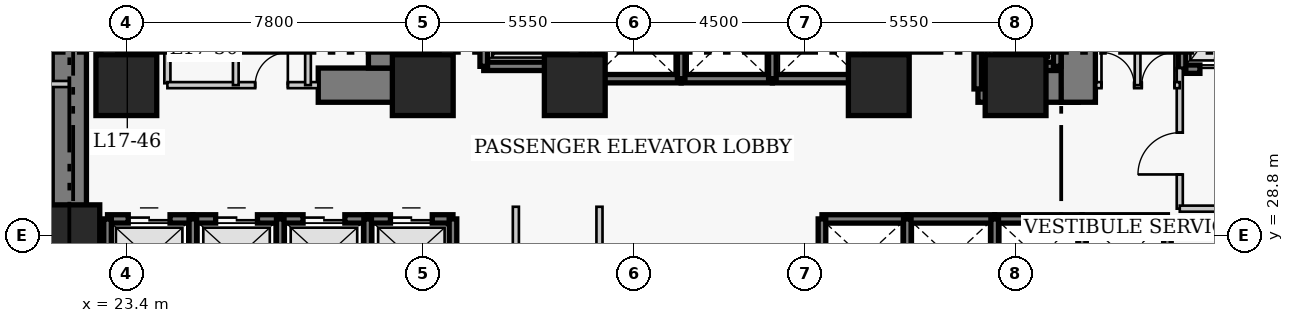
"""IFC4 building model, lengths in metres.
Left out: names, types, materials, properties, quantities, classifications, styles, units other than length and angle.
Written with IfcOpenShell. Run it as: python <this file> out.ifc"""

import sys

from ifc_helpers import new_model, si_unit, direction, frame, frame_2d, origin, origin_2d, place, context, subcontext, project, spatial, rectangle, extrude, element, fill, save


model = new_model("IFC4")
c1 = context("Model", 3, precision=1e-05, world=origin(), true_north=direction((0.0, 1.0)))
c2 = subcontext(c1, "Body", "Model", "MODEL_VIEW")
j1 = project(units=[si_unit("LENGTHUNIT", "METRE"), si_unit("PLANEANGLEUNIT", "RADIAN")], contexts=[c1])
p1 = place(None, origin())
s1 = spatial("IfcSite", under=j1, at=p1, CompositionType="ELEMENT")
p2 = place(p1, origin())
s2 = spatial("IfcBuilding", under=s1, at=p2, CompositionType="ELEMENT")
p3 = place(p2, frame((0.0, 0.0, 71.6)))
s3 = spatial("IfcBuildingStorey", under=s2, at=p3, CompositionType="ELEMENT", Elevation=71.6)
p4 = place(p3, frame((21.9, 27.05, 0.0), z_axis=(0.0, 0.0, 1.0), x_axis=(0.0, 1.0, 0.0)))
e1 = element("IfcWall", 1, at=p4, inside=s3, PredefinedType="SHEAR", context=c2, shape_type="SweptSolid", body=[
    extrude(rectangle(XDim=13.72, YDim=0.9, at=frame_2d((6.86, 0.0))), origin(), (0.0, 0.0, 1.0), 3.8),
])
p5 = place(p3, frame((28.45, 32.75, 0.0), z_axis=(0.0, 0.0, 1.0), x_axis=(1.0, 0.0, 0.0)))
e2 = element("IfcWall", 2, at=p5, inside=s3, PredefinedType="SHEAR", context=c2, shape_type="SweptSolid", body=[
    extrude(rectangle(XDim=2.4, YDim=0.9, at=frame_2d((1.2, 0.0))), origin(), (0.0, 0.0, 1.0), 3.8),
])
p6 = place(p3, frame((45.81, 32.75, 0.0), z_axis=(0.0, 0.0, 1.0), x_axis=(1.0, 0.0, 0.0)))
e3 = element("IfcWall", 3, at=p6, inside=s3, PredefinedType="SHEAR", context=c2, shape_type="SweptSolid", body=[
    extrude(rectangle(XDim=2.64, YDim=0.9, at=frame_2d((1.32, 0.0))), origin(), (0.0, 0.0, 1.0), 3.8),
])
p7 = place(p3, frame((30.22, 33.2, 0.0), z_axis=(0.0, 0.0, 1.0), x_axis=(0.0, 1.0, 0.0)))
e4 = element("IfcWall", 4, at=p7, inside=s3, PredefinedType="SHEAR", context=c2, shape_type="SweptSolid", body=[
    extrude(rectangle(XDim=7.12, YDim=0.9, at=frame_2d((3.56, 0.0))), origin(), (0.0, 0.0, 1.0), 3.8),
])
p8 = place(p3, frame((48.45, 32.3, 0.0), z_axis=(0.0, 0.0, 1.0), x_axis=(0.0, 1.0, 0.0)))
e5 = element("IfcWall", 5, at=p8, inside=s3, PredefinedType="SHEAR", context=c2, shape_type="SweptSolid", body=[
    extrude(rectangle(XDim=8.02, YDim=0.9, at=frame_2d((4.01, 0.0))), origin(), (0.0, 0.0, 1.0), 3.8),
])
p9 = place(p8, frame((5.9, 0.0, 0.0)))
e6 = element("IfcOpeningElement", 6, at=p9, cuts=e5, PredefinedType="OPENING", context=c2, shape_type="SweptSolid", body=[
    extrude(rectangle(XDim=1.1, YDim=2.15, at=frame_2d((0.55, 1.075))), frame((0.0, 0.46, 0.0), z_axis=(0.0, -1.0, 0.0), x_axis=(1.0, 0.0, 0.0)), (0.0, 0.0, 1.0), 0.92),
])
for number, where, z_axis, x_axis in (
    (7, (21.9, 28.8, 0.0), (0.0, 0.0, 1.0), (1.0, 0.0, 0.0)),
    (8, (23.4, 32.75, 0.0), (0.0, 0.0, 1.0), (1.0, 0.0, 0.0)),
    (9, (31.2, 32.75, 0.0), (0.0, 0.0, 1.0), (1.0, 0.0, 0.0)),
    (10, (35.2, 32.75, 0.0), (0.0, 0.0, 1.0), (1.0, 0.0, 0.0)),
    (11, (43.2, 32.75, 0.0), (0.0, 0.0, 1.0), (1.0, 0.0, 0.0)),
    (12, (46.8, 32.75, 0.0), (0.0, 0.0, 1.0), (1.0, 0.0, 0.0)),
):
    element("IfcColumn", number, at=place(p3, frame(where, z_axis=z_axis, x_axis=x_axis)), inside=s3, PredefinedType="COLUMN", context=c2, shape_type="SweptSolid", body=[
        extrude(rectangle(XDim=1.6, YDim=1.6, at=origin_2d()), origin(), (0.0, 0.0, 1.0), 3.8),
    ])
p10 = place(p3, frame((22.905, 29.23, 0.0), z_axis=(0.0, 0.0, 1.0), x_axis=(1.0, 0.0, 0.0)))
e13 = element("IfcWall", 13, at=p10, inside=s3, PredefinedType="SHEAR", context=c2, shape_type="SweptSolid", body=[
    extrude(rectangle(XDim=2.245, YDim=0.22, at=frame_2d((1.123, 0.0))), origin(), (0.0, 0.0, 1.0), 3.8),
])
p11 = place(p10, frame((0.545, 0.0, 0.0)))
e14 = element("IfcOpeningElement", 14, at=p11, cuts=e13, PredefinedType="OPENING", context=c2, shape_type="SweptSolid", body=[
    extrude(rectangle(XDim=1.1, YDim=2.15, at=frame_2d((0.55, 1.075))), frame((0.0, 0.12, 0.0), z_axis=(0.0, -1.0, 0.0), x_axis=(1.0, 0.0, 0.0)), (0.0, 0.0, 1.0), 0.24),
])
p12 = place(p3, frame((22.905, 27.17, 0.0), z_axis=(0.0, 0.0, 1.0), x_axis=(0.0, 1.0, 0.0)))
e15 = element("IfcWall", 15, at=p12, inside=s3, PredefinedType="SHEAR", context=c2, shape_type="SweptSolid", body=[
    extrude(rectangle(XDim=2.06, YDim=0.2, at=frame_2d((1.03, 0.0))), origin(), (0.0, 0.0, 1.0), 3.8),
])
p13 = place(p3, frame((25.15, 29.23, 0.0), z_axis=(0.0, 0.0, 1.0), x_axis=(1.0, 0.0, 0.0)))
e16 = element("IfcWall", 16, at=p13, inside=s3, PredefinedType="SHEAR", context=c2, shape_type="SweptSolid", body=[
    extrude(rectangle(XDim=2.3, YDim=0.22, at=frame_2d((1.15, 0.0))), origin(), (0.0, 0.0, 1.0), 3.8),
])
p14 = place(p13, frame((0.6, 0.0, 0.0)))
e17 = element("IfcOpeningElement", 17, at=p14, cuts=e16, PredefinedType="OPENING", context=c2, shape_type="SweptSolid", body=[
    extrude(rectangle(XDim=1.1, YDim=2.15, at=frame_2d((0.55, 1.075))), frame((0.0, 0.12, 0.0), z_axis=(0.0, -1.0, 0.0), x_axis=(1.0, 0.0, 0.0)), (0.0, 0.0, 1.0), 0.24),
])
p15 = place(p3, frame((25.15, 27.17, 0.0), z_axis=(0.0, 0.0, 1.0), x_axis=(0.0, 1.0, 0.0)))
e18 = element("IfcWall", 18, at=p15, inside=s3, PredefinedType="SHEAR", context=c2, shape_type="SweptSolid", body=[
    extrude(rectangle(XDim=2.06, YDim=0.2, at=frame_2d((1.03, 0.0))), origin(), (0.0, 0.0, 1.0), 3.8),
])
p16 = place(p3, frame((27.45, 29.23, 0.0), z_axis=(0.0, 0.0, 1.0), x_axis=(1.0, 0.0, 0.0)))
e19 = element("IfcWall", 19, at=p16, inside=s3, PredefinedType="SHEAR", context=c2, shape_type="SweptSolid", body=[
    extrude(rectangle(XDim=2.3, YDim=0.22, at=frame_2d((1.15, 0.0))), origin(), (0.0, 0.0, 1.0), 3.8),
])
p17 = place(p16, frame((0.6, 0.0, 0.0)))
e20 = element("IfcOpeningElement", 20, at=p17, cuts=e19, PredefinedType="OPENING", context=c2, shape_type="SweptSolid", body=[
    extrude(rectangle(XDim=1.1, YDim=2.15, at=frame_2d((0.55, 1.075))), frame((0.0, 0.12, 0.0), z_axis=(0.0, -1.0, 0.0), x_axis=(1.0, 0.0, 0.0)), (0.0, 0.0, 1.0), 0.24),
])
p18 = place(p3, frame((27.45, 27.17, 0.0), z_axis=(0.0, 0.0, 1.0), x_axis=(0.0, 1.0, 0.0)))
e21 = element("IfcWall", 21, at=p18, inside=s3, PredefinedType="SHEAR", context=c2, shape_type="SweptSolid", body=[
    extrude(rectangle(XDim=2.06, YDim=0.2, at=frame_2d((1.03, 0.0))), origin(), (0.0, 0.0, 1.0), 3.8),
])
p19 = place(p3, frame((29.75, 29.23, 0.0), z_axis=(0.0, 0.0, 1.0), x_axis=(1.0, 0.0, 0.0)))
e22 = element("IfcWall", 22, at=p19, inside=s3, PredefinedType="SHEAR", context=c2, shape_type="SweptSolid", body=[
    extrude(rectangle(XDim=2.245, YDim=0.22, at=frame_2d((1.123, 0.0))), origin(), (0.0, 0.0, 1.0), 3.8),
])
p20 = place(p19, frame((0.6, 0.0, 0.0)))
e23 = element("IfcOpeningElement", 23, at=p20, cuts=e22, PredefinedType="OPENING", context=c2, shape_type="SweptSolid", body=[
    extrude(rectangle(XDim=1.1, YDim=2.15, at=frame_2d((0.55, 1.075))), frame((0.0, 0.12, 0.0), z_axis=(0.0, -1.0, 0.0), x_axis=(1.0, 0.0, 0.0)), (0.0, 0.0, 1.0), 0.24),
])
for number, where, z_axis, x_axis in (
    (24, (29.75, 27.17, 0.0), (0.0, 0.0, 1.0), (0.0, 1.0, 0.0)),
    (25, (31.995, 27.17, 0.0), (0.0, 0.0, 1.0), (0.0, 1.0, 0.0)),
):
    element("IfcWall", number, at=place(p3, frame(where, z_axis=z_axis, x_axis=x_axis)), inside=s3, PredefinedType="SHEAR", context=c2, shape_type="SweptSolid", body=[
        extrude(rectangle(XDim=2.06, YDim=0.2, at=frame_2d((1.03, 0.0))), origin(), (0.0, 0.0, 1.0), 3.8),
    ])
p21 = place(p3, frame((41.705, 29.23, 0.0), z_axis=(0.0, 0.0, 1.0), x_axis=(1.0, 0.0, 0.0)))
e26 = element("IfcWall", 26, at=p21, inside=s3, PredefinedType="SHEAR", context=c2, shape_type="SweptSolid", body=[
    extrude(rectangle(XDim=2.245, YDim=0.22, at=frame_2d((1.123, 0.0))), origin(), (0.0, 0.0, 1.0), 3.8),
])
p22 = place(p3, frame((41.705, 27.17, 0.0), z_axis=(0.0, 0.0, 1.0), x_axis=(0.0, 1.0, 0.0)))
e27 = element("IfcWall", 27, at=p22, inside=s3, PredefinedType="SHEAR", context=c2, shape_type="SweptSolid", body=[
    extrude(rectangle(XDim=2.06, YDim=0.2, at=frame_2d((1.03, 0.0))), origin(), (0.0, 0.0, 1.0), 3.8),
])
p23 = place(p3, frame((43.95, 29.23, 0.0), z_axis=(0.0, 0.0, 1.0), x_axis=(1.0, 0.0, 0.0)))
e28 = element("IfcWall", 28, at=p23, inside=s3, PredefinedType="SHEAR", context=c2, shape_type="SweptSolid", body=[
    extrude(rectangle(XDim=2.3, YDim=0.22, at=frame_2d((1.15, 0.0))), origin(), (0.0, 0.0, 1.0), 3.8),
])
p24 = place(p3, frame((43.95, 27.17, 0.0), z_axis=(0.0, 0.0, 1.0), x_axis=(0.0, 1.0, 0.0)))
e29 = element("IfcWall", 29, at=p24, inside=s3, PredefinedType="SHEAR", context=c2, shape_type="SweptSolid", body=[
    extrude(rectangle(XDim=2.06, YDim=0.2, at=frame_2d((1.03, 0.0))), origin(), (0.0, 0.0, 1.0), 3.8),
])
p25 = place(p3, frame((46.25, 29.23, 0.0), z_axis=(0.0, 0.0, 1.0), x_axis=(1.0, 0.0, 0.0)))
e30 = element("IfcWall", 30, at=p25, inside=s3, PredefinedType="SHEAR", context=c2, shape_type="SweptSolid", body=[
    extrude(rectangle(XDim=2.3, YDim=0.22, at=frame_2d((1.15, 0.0))), origin(), (0.0, 0.0, 1.0), 3.8),
])
p26 = place(p3, frame((46.25, 27.17, 0.0), z_axis=(0.0, 0.0, 1.0), x_axis=(0.0, 1.0, 0.0)))
e31 = element("IfcWall", 31, at=p26, inside=s3, PredefinedType="SHEAR", context=c2, shape_type="SweptSolid", body=[
    extrude(rectangle(XDim=2.06, YDim=0.2, at=frame_2d((1.03, 0.0))), origin(), (0.0, 0.0, 1.0), 3.8),
])
p27 = place(p3, frame((48.55, 29.23, 0.0), z_axis=(0.0, 0.0, 1.0), x_axis=(1.0, 0.0, 0.0)))
e32 = element("IfcWall", 32, at=p27, inside=s3, PredefinedType="SHEAR", context=c2, shape_type="SweptSolid", body=[
    extrude(rectangle(XDim=2.245, YDim=0.22, at=frame_2d((1.123, 0.0))), origin(), (0.0, 0.0, 1.0), 3.8),
])
for number, where, z_axis, x_axis in (
    (33, (48.55, 27.17, 0.0), (0.0, 0.0, 1.0), (0.0, 1.0, 0.0)),
    (34, (50.795, 27.17, 0.0), (0.0, 0.0, 1.0), (0.0, 1.0, 0.0)),
):
    element("IfcWall", number, at=place(p3, frame(where, z_axis=z_axis, x_axis=x_axis)), inside=s3, PredefinedType="SHEAR", context=c2, shape_type="SweptSolid", body=[
        extrude(rectangle(XDim=2.06, YDim=0.2, at=frame_2d((1.03, 0.0))), origin(), (0.0, 0.0, 1.0), 3.8),
    ])
p28 = place(p3, frame((35.68, 32.92, 0.0), z_axis=(0.0, 0.0, 1.0), x_axis=(1.0, 0.0, 0.0)))
e35 = element("IfcWall", 35, at=p28, inside=s3, PredefinedType="SHEAR", context=c2, shape_type="SweptSolid", body=[
    extrude(rectangle(XDim=2.32, YDim=0.22, at=frame_2d((1.16, 0.0))), origin(), (0.0, 0.0, 1.0), 3.8),
])
p29 = place(p3, frame((35.68, 32.92, 0.0), z_axis=(0.0, 0.0, 1.0), x_axis=(0.0, 1.0, 0.0)))
e36 = element("IfcWall", 36, at=p29, inside=s3, PredefinedType="SHEAR", context=c2, shape_type="SweptSolid", body=[
    extrude(rectangle(XDim=2.16, YDim=0.2, at=frame_2d((1.08, 0.0))), origin(), (0.0, 0.0, 1.0), 3.8),
])
p30 = place(p3, frame((38.0, 32.92, 0.0), z_axis=(0.0, 0.0, 1.0), x_axis=(1.0, 0.0, 0.0)))
e37 = element("IfcWall", 37, at=p30, inside=s3, PredefinedType="SHEAR", context=c2, shape_type="SweptSolid", body=[
    extrude(rectangle(XDim=2.4, YDim=0.22, at=frame_2d((1.2, 0.0))), origin(), (0.0, 0.0, 1.0), 3.8),
])
p31 = place(p3, frame((38.0, 32.92, 0.0), z_axis=(0.0, 0.0, 1.0), x_axis=(0.0, 1.0, 0.0)))
e38 = element("IfcWall", 38, at=p31, inside=s3, PredefinedType="SHEAR", context=c2, shape_type="SweptSolid", body=[
    extrude(rectangle(XDim=2.16, YDim=0.2, at=frame_2d((1.08, 0.0))), origin(), (0.0, 0.0, 1.0), 3.8),
])
p32 = place(p3, frame((40.4, 32.92, 0.0), z_axis=(0.0, 0.0, 1.0), x_axis=(1.0, 0.0, 0.0)))
e39 = element("IfcWall", 39, at=p32, inside=s3, PredefinedType="SHEAR", context=c2, shape_type="SweptSolid", body=[
    extrude(rectangle(XDim=2.32, YDim=0.22, at=frame_2d((1.16, 0.0))), origin(), (0.0, 0.0, 1.0), 3.8),
])
for number, where, z_axis, x_axis in (
    (40, (40.4, 32.92, 0.0), (0.0, 0.0, 1.0), (0.0, 1.0, 0.0)),
    (41, (42.72, 32.92, 0.0), (0.0, 0.0, 1.0), (0.0, 1.0, 0.0)),
):
    element("IfcWall", number, at=place(p3, frame(where, z_axis=z_axis, x_axis=x_axis)), inside=s3, PredefinedType="SHEAR", context=c2, shape_type="SweptSolid", body=[
        extrude(rectangle(XDim=2.16, YDim=0.2, at=frame_2d((1.08, 0.0))), origin(), (0.0, 0.0, 1.0), 3.8),
    ])
p33 = place(p3, frame((51.18, 33.17, 0.0), z_axis=(0.0, 0.0, 1.0), x_axis=(1.0, 0.0, 0.0)))
e42 = element("IfcWall", 42, at=p33, inside=s3, PredefinedType="SHEAR", context=c2, shape_type="SweptSolid", body=[
    extrude(rectangle(XDim=2.42, YDim=0.22, at=frame_2d((1.21, 0.0))), origin(), (0.0, 0.0, 1.0), 3.8),
])
p34 = place(p33, frame((0.47, 0.0, 0.0)))
e43 = element("IfcOpeningElement", 43, at=p34, cuts=e42, PredefinedType="OPENING", context=c2, shape_type="SweptSolid", body=[
    extrude(rectangle(XDim=1.3, YDim=2.15, at=frame_2d((0.65, 1.075))), frame((0.0, 0.12, 0.0), z_axis=(0.0, -1.0, 0.0), x_axis=(1.0, 0.0, 0.0)), (0.0, 0.0, 1.0), 0.24),
])
p35 = place(p3, frame((51.18, 33.17, 0.0), z_axis=(0.0, 0.0, 1.0), x_axis=(0.0, 1.0, 0.0)))
e44 = element("IfcWall", 44, at=p35, inside=s3, PredefinedType="SHEAR", context=c2, shape_type="SweptSolid", body=[
    extrude(rectangle(XDim=2.86, YDim=0.2, at=frame_2d((1.43, 0.0))), origin(), (0.0, 0.0, 1.0), 3.8),
])
p36 = place(p3, frame((32.805, 33.245, 0.0), z_axis=(0.0, 0.0, 1.0), x_axis=(1.0, 0.0, 0.0)))
e45 = element("IfcWall", 45, at=p36, inside=s3, PredefinedType="SHEAR", context=c2, shape_type="SweptSolid", body=[
    extrude(rectangle(XDim=2.09, YDim=0.22, at=frame_2d((1.045, 0.0))), origin(), (0.0, 0.0, 1.0), 3.8),
])
for number, where, z_axis, x_axis in (
    (46, (32.805, 33.245, 0.0), (0.0, 0.0, 1.0), (0.0, 1.0, 0.0)),
    (47, (34.895, 33.245, 0.0), (0.0, 0.0, 1.0), (0.0, 1.0, 0.0)),
):
    element("IfcWall", number, at=place(p3, frame(where, z_axis=z_axis, x_axis=x_axis)), inside=s3, PredefinedType="SHEAR", context=c2, shape_type="SweptSolid", body=[
        extrude(rectangle(XDim=2.91, YDim=0.2, at=frame_2d((1.455, 0.0))), origin(), (0.0, 0.0, 1.0), 3.8),
    ])
p37 = place(p3, frame((45.805, 33.245, 0.0), z_axis=(0.0, 0.0, 1.0), x_axis=(1.0, 0.0, 0.0)))
e48 = element("IfcWall", 48, at=p37, inside=s3, PredefinedType="SHEAR", context=c2, shape_type="SweptSolid", body=[
    extrude(rectangle(XDim=2.09, YDim=0.22, at=frame_2d((1.045, 0.0))), origin(), (0.0, 0.0, 1.0), 3.8),
])
p38 = place(p3, frame((45.805, 32.65, 0.0), z_axis=(0.0, 0.0, 1.0), x_axis=(0.0, 1.0, 0.0)))
e49 = element("IfcWall", 49, at=p38, inside=s3, PredefinedType="SHEAR", context=c2, shape_type="SweptSolid", body=[
    extrude(rectangle(XDim=3.505, YDim=0.2, at=frame_2d((1.752, 0.0))), origin(), (0.0, 0.0, 1.0), 3.8),
])
p39 = place(p3, frame((47.895, 33.245, 0.0), z_axis=(0.0, 0.0, 1.0), x_axis=(0.0, 1.0, 0.0)))
e50 = element("IfcWall", 50, at=p39, inside=s3, PredefinedType="SHEAR", context=c2, shape_type="SweptSolid", body=[
    extrude(rectangle(XDim=2.91, YDim=0.2, at=frame_2d((1.455, 0.0))), origin(), (0.0, 0.0, 1.0), 3.8),
])
p40 = place(p3, frame((24.48, 32.8, 0.0), z_axis=(0.0, 0.0, 1.0), x_axis=(0.0, 1.0, 0.0)))
e51 = element("IfcWall", 51, at=p40, inside=s3, PredefinedType="PARTITIONING", context=c2, shape_type="SweptSolid", body=[
    extrude(rectangle(XDim=3.57, YDim=0.16, at=frame_2d((1.785, 0.0))), origin(), (0.0, 0.0, 1.0), 3.42),
])
p41 = place(p40, frame((1.604, 0.0, 0.0)))
e52 = element("IfcOpeningElement", 52, at=p41, cuts=e51, PredefinedType="OPENING", context=c2, shape_type="SweptSolid", body=[
    extrude(rectangle(XDim=0.9, YDim=2.1, at=frame_2d((0.45, 1.05))), frame((0.0, 0.09, 0.0), z_axis=(0.0, -1.0, 0.0), x_axis=(1.0, 0.0, 0.0)), (0.0, 0.0, 1.0), 0.18),
])
p42 = place(p3, frame((51.12, 29.5, 0.0), z_axis=(0.0, 0.0, 1.0), x_axis=(0.0, 1.0, 0.0)))
e53 = element("IfcWall", 53, at=p42, inside=s3, PredefinedType="PARTITIONING", context=c2, shape_type="SweptSolid", body=[
    extrude(rectangle(XDim=3.7, YDim=0.16, at=frame_2d((1.85, 0.0))), origin(), (0.0, 0.0, 1.0), 3.42),
])
p43 = place(p42, frame((0.9, 0.0, 0.0)))
e54 = element("IfcOpeningElement", 54, at=p43, cuts=e53, PredefinedType="OPENING", context=c2, shape_type="SweptSolid", body=[
    extrude(rectangle(XDim=1.1, YDim=2.15, at=frame_2d((0.55, 1.075))), frame((0.0, 0.09, 0.0), z_axis=(0.0, -1.0, 0.0), x_axis=(1.0, 0.0, 0.0)), (0.0, 0.0, 1.0), 0.18),
])
p44 = place(p3, frame((51.12, 29.5, 0.0), z_axis=(0.0, 0.0, 1.0), x_axis=(1.0, 0.0, 0.0)))
e55 = element("IfcWall", 55, at=p44, inside=s3, PredefinedType="PARTITIONING", context=c2, shape_type="SweptSolid", body=[
    extrude(rectangle(XDim=5.63, YDim=0.16, at=frame_2d((2.815, 0.0))), origin(), (0.0, 0.0, 1.0), 3.42),
])
p45 = place(p3, frame((24.48, 32.75, 0.0), z_axis=(0.0, 0.0, 1.0), x_axis=(1.0, 0.0, 0.0)))
e56 = element("IfcWall", 56, at=p45, inside=s3, PredefinedType="PARTITIONING", context=c2, shape_type="SweptSolid", body=[
    extrude(rectangle(XDim=3.97, YDim=0.16, at=frame_2d((1.985, 0.0))), origin(), (0.0, 0.0, 1.0), 3.42),
])
p46 = place(p45, frame((2.31, 0.0, 0.0)))
e57 = element("IfcOpeningElement", 57, at=p46, cuts=e56, PredefinedType="OPENING", context=c2, shape_type="SweptSolid", body=[
    extrude(rectangle(XDim=0.86, YDim=2.05, at=frame_2d((0.43, 1.025))), frame((0.0, 0.09, 0.0), z_axis=(0.0, -1.0, 0.0), x_axis=(1.0, 0.0, 0.0)), (0.0, 0.0, 1.0), 0.18),
])
p47 = place(p3, frame((48.92, 32.75, 0.0), z_axis=(0.0, 0.0, 1.0), x_axis=(1.0, 0.0, 0.0)))
e58 = element("IfcWall", 58, at=p47, inside=s3, PredefinedType="PARTITIONING", context=c2, shape_type="SweptSolid", body=[
    extrude(rectangle(XDim=2.2, YDim=0.16, at=frame_2d((1.1, 0.0))), origin(), (0.0, 0.0, 1.0), 3.42),
])
p48 = place(p47, frame((0.14, 0.0, 0.0)))
e59 = element("IfcOpeningElement", 59, at=p48, cuts=e58, PredefinedType="OPENING", context=c2, shape_type="SweptSolid", body=[
    extrude(rectangle(XDim=0.86, YDim=2.05, at=frame_2d((0.43, 1.025))), frame((0.0, 0.09, 0.0), z_axis=(0.0, -1.0, 0.0), x_axis=(1.0, 0.0, 0.0)), (0.0, 0.0, 1.0), 0.18),
])
p49 = place(p47, frame((1.2, 0.0, 0.0)))
e60 = element("IfcOpeningElement", 60, at=p49, cuts=e58, PredefinedType="OPENING", context=c2, shape_type="SweptSolid", body=[
    extrude(rectangle(XDim=0.86, YDim=2.05, at=frame_2d((0.43, 1.025))), frame((0.0, 0.09, 0.0), z_axis=(0.0, -1.0, 0.0), x_axis=(1.0, 0.0, 0.0)), (0.0, 0.0, 1.0), 0.18),
])
for number, where, z_axis, x_axis in (
    (61, (26.28, 32.75, 0.0), (0.0, 0.0, 1.0), (0.0, 1.0, 0.0)),
    (62, (28.18, 32.75, 0.0), (0.0, 0.0, 1.0), (0.0, 1.0, 0.0)),
    (63, (50.01, 32.75, 0.0), (0.0, 0.0, 1.0), (0.0, 1.0, 0.0)),
):
    element("IfcWall", number, at=place(p3, frame(where, z_axis=z_axis, x_axis=x_axis)), inside=s3, PredefinedType="PARTITIONING", context=c2, shape_type="SweptSolid", body=[
        extrude(rectangle(XDim=3.62, YDim=0.15, at=frame_2d((1.81, 0.0))), origin(), (0.0, 0.0, 1.0), 3.42),
    ])
for number, where, z_axis, x_axis in (
    (64, (33.65, 24.91, 0.0), (0.0, 0.0, 1.0), (0.0, 1.0, 0.0)),
    (65, (35.85, 24.91, 0.0), (0.0, 0.0, 1.0), (0.0, 1.0, 0.0)),
):
    element("IfcWall", number, at=place(p3, frame(where, z_axis=z_axis, x_axis=x_axis)), inside=s3, PredefinedType="PARTITIONING", context=c2, shape_type="SweptSolid", body=[
        extrude(rectangle(XDim=4.64, YDim=0.16, at=frame_2d((2.32, 0.0))), origin(), (0.0, 0.0, 1.0), 3.42),
    ])
p50 = place(p3, frame((19.16, 32.78, 0.0), z_axis=(0.0, 0.0, 1.0), x_axis=(1.0, 0.0, 0.0)))
e66 = element("IfcWall", 66, at=p50, inside=s3, PredefinedType="PARTITIONING", context=c2, shape_type="SweptSolid", body=[
    extrude(rectangle(XDim=2.74, YDim=0.16, at=frame_2d((1.37, 0.0))), origin(), (0.0, 0.0, 1.0), 3.42),
])
p51 = place(p11, origin())
e67 = element("IfcDoor", 67, at=p51, inside=s3, OperationType="DOUBLE_DOOR_SLIDING", PredefinedType="DOOR", context=c2, shape_type="SweptSolid", body=[
    extrude(rectangle(XDim=1.1, YDim=2.15, at=frame_2d((0.55, 1.075))), frame((0.0, 0.025, 0.0), z_axis=(0.0, -1.0, 0.0), x_axis=(1.0, 0.0, 0.0)), (0.0, 0.0, 1.0), 0.05),
])
fill(e14, e67)
p52 = place(p14, origin())
e68 = element("IfcDoor", 68, at=p52, inside=s3, OperationType="DOUBLE_DOOR_SLIDING", PredefinedType="DOOR", context=c2, shape_type="SweptSolid", body=[
    extrude(rectangle(XDim=1.1, YDim=2.15, at=frame_2d((0.55, 1.075))), frame((0.0, 0.025, 0.0), z_axis=(0.0, -1.0, 0.0), x_axis=(1.0, 0.0, 0.0)), (0.0, 0.0, 1.0), 0.05),
])
fill(e17, e68)
p53 = place(p17, origin())
e69 = element("IfcDoor", 69, at=p53, inside=s3, OperationType="DOUBLE_DOOR_SLIDING", PredefinedType="DOOR", context=c2, shape_type="SweptSolid", body=[
    extrude(rectangle(XDim=1.1, YDim=2.15, at=frame_2d((0.55, 1.075))), frame((0.0, 0.025, 0.0), z_axis=(0.0, -1.0, 0.0), x_axis=(1.0, 0.0, 0.0)), (0.0, 0.0, 1.0), 0.05),
])
fill(e20, e69)
p54 = place(p20, origin())
e70 = element("IfcDoor", 70, at=p54, inside=s3, OperationType="DOUBLE_DOOR_SLIDING", PredefinedType="DOOR", context=c2, shape_type="SweptSolid", body=[
    extrude(rectangle(XDim=1.1, YDim=2.15, at=frame_2d((0.55, 1.075))), frame((0.0, 0.025, 0.0), z_axis=(0.0, -1.0, 0.0), x_axis=(1.0, 0.0, 0.0)), (0.0, 0.0, 1.0), 0.05),
])
fill(e23, e70)
p55 = place(p34, origin())
e71 = element("IfcDoor", 71, at=p55, inside=s3, OperationType="DOUBLE_DOOR_SLIDING", PredefinedType="DOOR", context=c2, shape_type="SweptSolid", body=[
    extrude(rectangle(XDim=1.3, YDim=2.15, at=frame_2d((0.65, 1.075))), frame((0.0, 0.025, 0.0), z_axis=(0.0, -1.0, 0.0), x_axis=(1.0, 0.0, 0.0)), (0.0, 0.0, 1.0), 0.05),
])
fill(e43, e71)
p56 = place(p43, origin())
e72 = element("IfcDoor", 72, at=p56, inside=s3, OperationType="SINGLE_SWING_LEFT", PredefinedType="DOOR", context=c2, shape_type="SweptSolid", body=[
    extrude(rectangle(XDim=1.1, YDim=2.15, at=frame_2d((0.55, 1.075))), frame((0.0, 0.025, 0.0), z_axis=(0.0, -1.0, 0.0), x_axis=(1.0, 0.0, 0.0)), (0.0, 0.0, 1.0), 0.05),
])
fill(e54, e72)
p57 = place(p46, origin())
e73 = element("IfcDoor", 73, at=p57, inside=s3, OperationType="SINGLE_SWING_RIGHT", PredefinedType="DOOR", context=c2, shape_type="SweptSolid", body=[
    extrude(rectangle(XDim=0.86, YDim=2.05, at=frame_2d((0.43, 1.025))), frame((0.0, 0.025, 0.0), z_axis=(0.0, -1.0, 0.0), x_axis=(1.0, 0.0, 0.0)), (0.0, 0.0, 1.0), 0.05),
])
fill(e57, e73)
p58 = place(p48, origin())
e74 = element("IfcDoor", 74, at=p58, inside=s3, OperationType="SINGLE_SWING_LEFT", PredefinedType="DOOR", context=c2, shape_type="SweptSolid", body=[
    extrude(rectangle(XDim=0.86, YDim=2.05, at=frame_2d((0.43, 1.025))), frame((0.0, 0.025, 0.0), z_axis=(0.0, -1.0, 0.0), x_axis=(1.0, 0.0, 0.0)), (0.0, 0.0, 1.0), 0.05),
])
fill(e59, e74)
p59 = place(p49, origin())
e75 = element("IfcDoor", 75, at=p59, inside=s3, OperationType="SINGLE_SWING_RIGHT", PredefinedType="DOOR", context=c2, shape_type="SweptSolid", body=[
    extrude(rectangle(XDim=0.86, YDim=2.05, at=frame_2d((0.43, 1.025))), frame((0.0, 0.025, 0.0), z_axis=(0.0, -1.0, 0.0), x_axis=(1.0, 0.0, 0.0)), (0.0, 0.0, 1.0), 0.05),
])
fill(e60, e75)
save(model, sys.argv[1])
